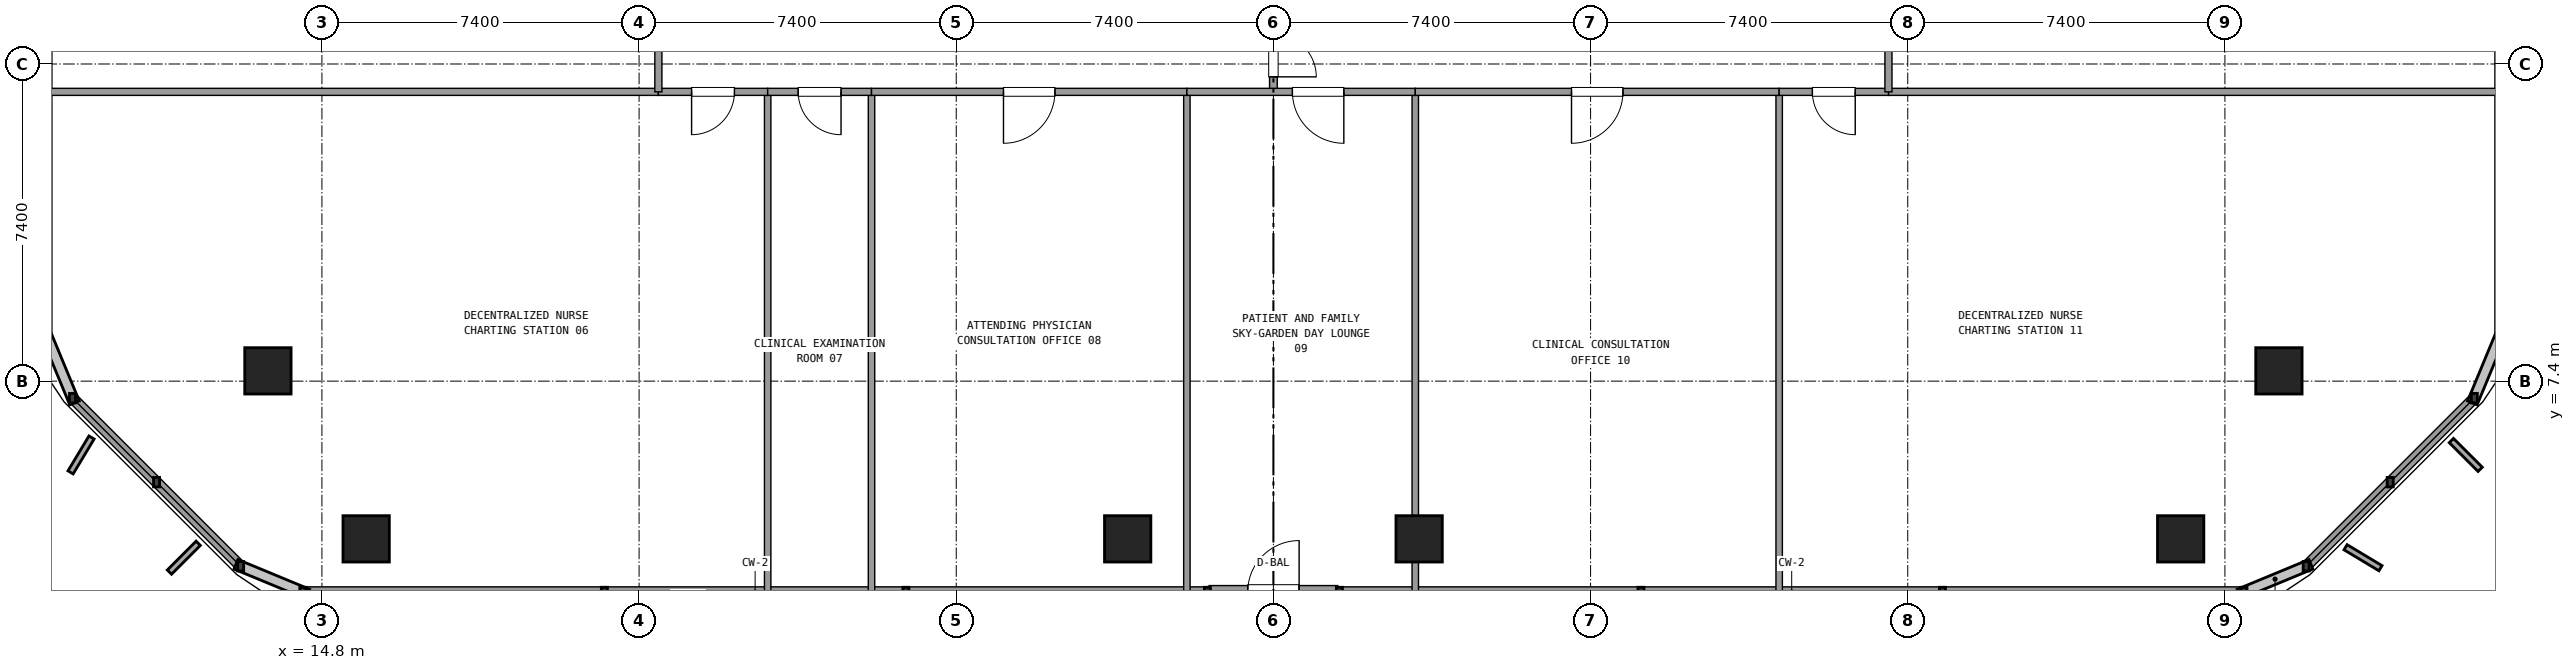
"""IFC4 building model, lengths in metres.
Left out: names, types, materials, properties, quantities, classifications, styles, units other than length and angle.
Written with IfcOpenShell. Run it as: python <this file> out.ifc"""

import sys

from ifc_helpers import new_model, si_unit, direction, frame, frame_2d, origin, origin_2d, place, context, subcontext, project, spatial, rectangle, extrude, element, fill, save


model = new_model("IFC4")
c1 = context("Model", 3, precision=1e-05, world=origin(), true_north=direction((0.0, 1.0)))
c2 = subcontext(c1, "Body", "Model", "MODEL_VIEW")
j1 = project(units=[si_unit("LENGTHUNIT", "METRE"), si_unit("PLANEANGLEUNIT", "RADIAN")], contexts=[c1])
p1 = place(None, origin())
s1 = spatial("IfcSite", under=j1, at=p1, CompositionType="ELEMENT")
p2 = place(p1, origin())
s2 = spatial("IfcBuilding", under=s1, at=p2, CompositionType="ELEMENT")
p3 = place(p2, frame((0.0, 0.0, 23.94)))
s3 = spatial("IfcBuildingStorey", under=s2, at=p3, CompositionType="ELEMENT", Elevation=23.94)
for number, where, z_axis, x_axis in (
    (1, (13.54, 7.64, 0.0), (0.0, 0.0, 1.0), (1.0, 0.0, 0.0)),
    (2, (15.832, 3.72, 0.0), (0.0, 0.0, 1.0), (1.0, 0.0, 0.0)),
    (3, (33.6, 3.72, 0.0), (0.0, 0.0, 1.0), (1.0, 0.0, 0.0)),
    (4, (40.4, 3.72, 0.0), (0.0, 0.0, 1.0), (1.0, 0.0, 0.0)),
    (5, (58.168, 3.72, 0.0), (0.0, 0.0, 1.0), (1.0, 0.0, 0.0)),
    (6, (60.46, 7.64, 0.0), (0.0, 0.0, 1.0), (1.0, 0.0, 0.0)),
):
    element("IfcColumn", number, at=place(p3, frame(where, z_axis=z_axis, x_axis=x_axis)), inside=s3, PredefinedType="COLUMN", context=c2, shape_type="SweptSolid", body=[
        extrude(rectangle(XDim=1.08, YDim=1.08, at=origin_2d()), origin(), (0.0, 0.0, 1.0), 3.6),
    ])
p4 = place(p3, frame((35.5, 2.48, 0.0), z_axis=(0.0, 0.0, 1.0), x_axis=(1.0, 0.0, 0.0)))
e7 = element("IfcWall", 7, at=p4, inside=s3, PredefinedType="SOLIDWALL", context=c2, shape_type="SweptSolid", body=[
    extrude(rectangle(XDim=3.0, YDim=0.3, at=frame_2d((1.5, 0.0))), origin(), (0.0, 0.0, 1.0), 2.65),
])
p5 = place(p4, frame((0.9, 0.0, 0.0)))
e8 = element("IfcOpeningElement", 8, at=p5, cuts=e7, PredefinedType="OPENING", context=c2, shape_type="SweptSolid", body=[
    extrude(rectangle(XDim=1.2, YDim=2.2, at=frame_2d((0.6, 1.1))), frame((0.0, 0.16, 0.0), z_axis=(0.0, -1.0, 0.0), x_axis=(1.0, 0.0, 0.0)), (0.0, 0.0, 1.0), 0.32),
])
for number, where, z_axis, x_axis in (
    (9, (14.355, 2.48, 0.0), (0.0, 0.0, 1.0), (1.0, 0.0, 0.0)),
    (10, (38.54, 2.48, 0.0), (0.0, 0.0, 1.0), (1.0, 0.0, 0.0)),
):
    element("IfcWall", number, at=place(p3, frame(where, z_axis=z_axis, x_axis=x_axis)), inside=s3, PredefinedType="SOLIDWALL", context=c2, shape_type="SweptSolid", body=[
        extrude(rectangle(XDim=21.105, YDim=0.24, at=frame_2d((10.552, 0.0))), origin(), (0.0, 0.0, 1.0), 0.85),
    ])
for number, where, z_axis, x_axis in (
    (11, (61.096, 3.081, 0.0), (0.0, 0.0, 1.0), (0.707, 0.707, 0.0)),
    (12, (8.981, 7.004, 0.0), (0.0, 0.0, 1.0), (0.707, -0.707, 0.0)),
):
    element("IfcWall", number, at=place(p3, frame(where, z_axis=z_axis, x_axis=x_axis)), inside=s3, PredefinedType="SOLIDWALL", context=c2, shape_type="SweptSolid", body=[
        extrude(rectangle(XDim=5.548, YDim=0.24, at=frame_2d((2.774, 0.0))), origin(), (0.0, 0.0, 1.0), 0.85),
    ])
p6 = place(p3, frame((37.0, 14.15, 0.0), z_axis=(0.0, 0.0, 1.0), x_axis=(0.0, 1.0, 0.0)))
e13 = element("IfcWall", 13, at=p6, inside=s3, PredefinedType="PARTITIONING", context=c2, shape_type="SweptSolid", body=[
    extrude(rectangle(XDim=2.7, YDim=0.18, at=frame_2d((1.35, 0.0))), origin(), (0.0, 0.0, 1.0), 2.61),
])
p7 = place(p6, frame((0.35, 0.0, 0.0)))
e14 = element("IfcOpeningElement", 14, at=p7, cuts=e13, PredefinedType="OPENING", context=c2, shape_type="SweptSolid", body=[
    extrude(rectangle(XDim=2.0, YDim=2.2, at=frame_2d((1.0, 1.1))), frame((0.0, 0.1, 0.0), z_axis=(0.0, -1.0, 0.0), x_axis=(1.0, 0.0, 0.0)), (0.0, 0.0, 1.0), 0.2),
])
for number, where, z_axis, x_axis in (
    (15, (8.4, 14.15, 0.0), (0.0, 0.0, 1.0), (1.0, 0.0, 0.0)),
    (16, (51.35, 14.15, 0.0), (0.0, 0.0, 1.0), (1.0, 0.0, 0.0)),
):
    element("IfcWall", number, at=place(p3, frame(where, z_axis=z_axis, x_axis=x_axis)), inside=s3, PredefinedType="PARTITIONING", context=c2, shape_type="SweptSolid", body=[
        extrude(rectangle(XDim=14.25, YDim=0.165, at=frame_2d((7.125, 0.0))), origin(), (0.0, 0.0, 1.0), 2.61),
    ])
p8 = place(p3, frame((25.2, 14.15, 0.0), z_axis=(0.0, 0.0, 1.0), x_axis=(0.0, -1.0, 0.0)))
e17 = element("IfcWall", 17, at=p8, inside=s3, PredefinedType="PARTITIONING", context=c2, shape_type="SweptSolid", body=[
    extrude(rectangle(XDim=11.65, YDim=0.15, at=frame_2d((5.825, 0.0))), origin(), (0.0, 0.0, 1.0), 2.61),
])
p9 = place(p3, frame((22.65, 14.15, 0.0), z_axis=(0.0, 0.0, 1.0), x_axis=(1.0, 0.0, 0.0)))
e18 = element("IfcWall", 18, at=p9, inside=s3, PredefinedType="PARTITIONING", context=c2, shape_type="SweptSolid", body=[
    extrude(rectangle(XDim=2.55, YDim=0.165, at=frame_2d((1.275, 0.0))), origin(), (0.0, 0.0, 1.0), 2.61),
])
p10 = place(p9, frame((0.775, 0.0, 0.0)))
e19 = element("IfcOpeningElement", 19, at=p10, cuts=e18, PredefinedType="OPENING", context=c2, shape_type="SweptSolid", body=[
    extrude(rectangle(XDim=1.0, YDim=2.15, at=frame_2d((0.5, 1.075))), frame((0.0, 0.093, 0.0), z_axis=(0.0, -1.0, 0.0), x_axis=(1.0, 0.0, 0.0)), (0.0, 0.0, 1.0), 0.185),
])
p11 = place(p3, frame((27.623, 14.15, 0.0), z_axis=(0.0, 0.0, 1.0), x_axis=(0.0, -1.0, 0.0)))
e20 = element("IfcWall", 20, at=p11, inside=s3, PredefinedType="PARTITIONING", context=c2, shape_type="SweptSolid", body=[
    extrude(rectangle(XDim=11.65, YDim=0.15, at=frame_2d((5.825, 0.0))), origin(), (0.0, 0.0, 1.0), 2.61),
])
p12 = place(p3, frame((25.2, 14.15, 0.0), z_axis=(0.0, 0.0, 1.0), x_axis=(1.0, 0.0, 0.0)))
e21 = element("IfcWall", 21, at=p12, inside=s3, PredefinedType="PARTITIONING", context=c2, shape_type="SweptSolid", body=[
    extrude(rectangle(XDim=2.423, YDim=0.165, at=frame_2d((1.211, 0.0))), origin(), (0.0, 0.0, 1.0), 2.61),
])
p13 = place(p12, frame((0.712, 0.0, 0.0)))
e22 = element("IfcOpeningElement", 22, at=p13, cuts=e21, PredefinedType="OPENING", context=c2, shape_type="SweptSolid", body=[
    extrude(rectangle(XDim=1.0, YDim=2.15, at=frame_2d((0.5, 1.075))), frame((0.0, 0.093, 0.0), z_axis=(0.0, -1.0, 0.0), x_axis=(1.0, 0.0, 0.0)), (0.0, 0.0, 1.0), 0.185),
])
p14 = place(p3, frame((34.981, 14.15, 0.0), z_axis=(0.0, 0.0, 1.0), x_axis=(0.0, -1.0, 0.0)))
e23 = element("IfcWall", 23, at=p14, inside=s3, PredefinedType="PARTITIONING", context=c2, shape_type="SweptSolid", body=[
    extrude(rectangle(XDim=11.65, YDim=0.15, at=frame_2d((5.825, 0.0))), origin(), (0.0, 0.0, 1.0), 2.61),
])
p15 = place(p3, frame((27.623, 14.15, 0.0), z_axis=(0.0, 0.0, 1.0), x_axis=(1.0, 0.0, 0.0)))
e24 = element("IfcWall", 24, at=p15, inside=s3, PredefinedType="PARTITIONING", context=c2, shape_type="SweptSolid", body=[
    extrude(rectangle(XDim=7.358, YDim=0.165, at=frame_2d((3.679, 0.0))), origin(), (0.0, 0.0, 1.0), 2.61),
])
p16 = place(p15, frame((3.079, 0.0, 0.0)))
e25 = element("IfcOpeningElement", 25, at=p16, cuts=e24, PredefinedType="OPENING", context=c2, shape_type="SweptSolid", body=[
    extrude(rectangle(XDim=1.2, YDim=2.15, at=frame_2d((0.6, 1.075))), frame((0.0, 0.093, 0.0), z_axis=(0.0, -1.0, 0.0), x_axis=(1.0, 0.0, 0.0)), (0.0, 0.0, 1.0), 0.185),
])
p17 = place(p3, frame((40.31, 14.15, 0.0), z_axis=(0.0, 0.0, 1.0), x_axis=(0.0, -1.0, 0.0)))
e26 = element("IfcWall", 26, at=p17, inside=s3, PredefinedType="PARTITIONING", context=c2, shape_type="SweptSolid", body=[
    extrude(rectangle(XDim=11.65, YDim=0.15, at=frame_2d((5.825, 0.0))), origin(), (0.0, 0.0, 1.0), 2.61),
])
p18 = place(p3, frame((34.981, 14.15, 0.0), z_axis=(0.0, 0.0, 1.0), x_axis=(1.0, 0.0, 0.0)))
e27 = element("IfcWall", 27, at=p18, inside=s3, PredefinedType="PARTITIONING", context=c2, shape_type="SweptSolid", body=[
    extrude(rectangle(XDim=5.329, YDim=0.165, at=frame_2d((2.665, 0.0))), origin(), (0.0, 0.0, 1.0), 2.61),
])
p19 = place(p18, frame((2.462, 0.0, 0.0)))
e28 = element("IfcOpeningElement", 28, at=p19, cuts=e27, PredefinedType="OPENING", context=c2, shape_type="SweptSolid", body=[
    extrude(rectangle(XDim=1.2, YDim=2.15, at=frame_2d((0.6, 1.075))), frame((0.0, 0.093, 0.0), z_axis=(0.0, -1.0, 0.0), x_axis=(1.0, 0.0, 0.0)), (0.0, 0.0, 1.0), 0.185),
])
p20 = place(p3, frame((48.8, 14.15, 0.0), z_axis=(0.0, 0.0, 1.0), x_axis=(0.0, -1.0, 0.0)))
e29 = element("IfcWall", 29, at=p20, inside=s3, PredefinedType="PARTITIONING", context=c2, shape_type="SweptSolid", body=[
    extrude(rectangle(XDim=11.65, YDim=0.15, at=frame_2d((5.825, 0.0))), origin(), (0.0, 0.0, 1.0), 2.61),
])
p21 = place(p3, frame((40.31, 14.15, 0.0), z_axis=(0.0, 0.0, 1.0), x_axis=(1.0, 0.0, 0.0)))
e30 = element("IfcWall", 30, at=p21, inside=s3, PredefinedType="PARTITIONING", context=c2, shape_type="SweptSolid", body=[
    extrude(rectangle(XDim=8.49, YDim=0.165, at=frame_2d((4.245, 0.0))), origin(), (0.0, 0.0, 1.0), 2.61),
])
p22 = place(p21, frame((3.645, 0.0, 0.0)))
e31 = element("IfcOpeningElement", 31, at=p22, cuts=e30, PredefinedType="OPENING", context=c2, shape_type="SweptSolid", body=[
    extrude(rectangle(XDim=1.2, YDim=2.15, at=frame_2d((0.6, 1.075))), frame((0.0, 0.093, 0.0), z_axis=(0.0, -1.0, 0.0), x_axis=(1.0, 0.0, 0.0)), (0.0, 0.0, 1.0), 0.185),
])
p23 = place(p3, frame((48.8, 14.15, 0.0), z_axis=(0.0, 0.0, 1.0), x_axis=(1.0, 0.0, 0.0)))
e32 = element("IfcWall", 32, at=p23, inside=s3, PredefinedType="PARTITIONING", context=c2, shape_type="SweptSolid", body=[
    extrude(rectangle(XDim=2.55, YDim=0.165, at=frame_2d((1.275, 0.0))), origin(), (0.0, 0.0, 1.0), 2.61),
])
p24 = place(p23, frame((0.775, 0.0, 0.0)))
e33 = element("IfcOpeningElement", 33, at=p24, cuts=e32, PredefinedType="OPENING", context=c2, shape_type="SweptSolid", body=[
    extrude(rectangle(XDim=1.0, YDim=2.15, at=frame_2d((0.5, 1.075))), frame((0.0, 0.093, 0.0), z_axis=(0.0, -1.0, 0.0), x_axis=(1.0, 0.0, 0.0)), (0.0, 0.0, 1.0), 0.185),
])
p25 = place(p3, frame((22.65, 14.15, 0.0), z_axis=(0.0, 0.0, 1.0), x_axis=(0.0, 1.0, 0.0)))
e34 = element("IfcWall", 34, at=p25, inside=s3, PredefinedType="PARTITIONING", context=c2, shape_type="SweptSolid", body=[
    extrude(rectangle(XDim=8.46, YDim=0.165, at=frame_2d((4.23, 0.0))), origin(), (0.0, 0.0, 1.0), 2.61),
])
p26 = place(p25, frame((3.63, 0.0, 0.0)))
e35 = element("IfcOpeningElement", 35, at=p26, cuts=e34, PredefinedType="OPENING", context=c2, shape_type="SweptSolid", body=[
    extrude(rectangle(XDim=1.2, YDim=2.15, at=frame_2d((0.6, 1.075))), frame((0.0, 0.093, 0.0), z_axis=(0.0, -1.0, 0.0), x_axis=(1.0, 0.0, 0.0)), (0.0, 0.0, 1.0), 0.185),
])
p27 = place(p3, frame((51.35, 14.15, 0.0), z_axis=(0.0, 0.0, 1.0), x_axis=(0.0, 1.0, 0.0)))
e36 = element("IfcWall", 36, at=p27, inside=s3, PredefinedType="PARTITIONING", context=c2, shape_type="SweptSolid", body=[
    extrude(rectangle(XDim=6.58, YDim=0.165, at=frame_2d((3.29, 0.0))), origin(), (0.0, 0.0, 1.0), 2.61),
])
p28 = place(p27, frame((2.69, 0.0, 0.0)))
e37 = element("IfcOpeningElement", 37, at=p28, cuts=e36, PredefinedType="OPENING", context=c2, shape_type="SweptSolid", body=[
    extrude(rectangle(XDim=1.2, YDim=2.15, at=frame_2d((0.6, 1.075))), frame((0.0, 0.093, 0.0), z_axis=(0.0, -1.0, 0.0), x_axis=(1.0, 0.0, 0.0)), (0.0, 0.0, 1.0), 0.185),
])
p29 = place(p7, frame((2.0, 0.0, 0.0), z_axis=(0.0, 0.0, 1.0), x_axis=(-1.0, 0.0, 0.0)))
e38 = element("IfcDoor", 38, at=p29, inside=s3, OperationType="DOUBLE_DOOR_SINGLE_SWING", PredefinedType="DOOR", context=c2, shape_type="SweptSolid", body=[
    extrude(rectangle(XDim=2.0, YDim=2.2, at=frame_2d((1.0, 1.1))), frame((0.0, 0.025, 0.0), z_axis=(0.0, -1.0, 0.0), x_axis=(1.0, 0.0, 0.0)), (0.0, 0.0, 1.0), 0.05),
])
fill(e14, e38)
p30 = place(p10, frame((1.0, 0.0, 0.0), z_axis=(0.0, 0.0, 1.0), x_axis=(-1.0, 0.0, 0.0)))
e39 = element("IfcDoor", 39, at=p30, inside=s3, OperationType="SINGLE_SWING_LEFT", PredefinedType="DOOR", context=c2, shape_type="SweptSolid", body=[
    extrude(rectangle(XDim=1.0, YDim=2.15, at=frame_2d((0.5, 1.075))), frame((0.0, 0.025, 0.0), z_axis=(0.0, -1.0, 0.0), x_axis=(1.0, 0.0, 0.0)), (0.0, 0.0, 1.0), 0.05),
])
fill(e19, e39)
p31 = place(p13, frame((1.0, 0.0, 0.0), z_axis=(0.0, 0.0, 1.0), x_axis=(-1.0, 0.0, 0.0)))
e40 = element("IfcDoor", 40, at=p31, inside=s3, OperationType="SINGLE_SWING_RIGHT", PredefinedType="DOOR", context=c2, shape_type="SweptSolid", body=[
    extrude(rectangle(XDim=1.0, YDim=2.15, at=frame_2d((0.5, 1.075))), frame((0.0, 0.025, 0.0), z_axis=(0.0, -1.0, 0.0), x_axis=(1.0, 0.0, 0.0)), (0.0, 0.0, 1.0), 0.05),
])
fill(e22, e40)
p32 = place(p16, frame((1.2, 0.0, 0.0), z_axis=(0.0, 0.0, 1.0), x_axis=(-1.0, 0.0, 0.0)))
e41 = element("IfcDoor", 41, at=p32, inside=s3, OperationType="SINGLE_SWING_LEFT", PredefinedType="DOOR", context=c2, shape_type="SweptSolid", body=[
    extrude(rectangle(XDim=1.2, YDim=2.15, at=frame_2d((0.6, 1.075))), frame((0.0, 0.025, 0.0), z_axis=(0.0, -1.0, 0.0), x_axis=(1.0, 0.0, 0.0)), (0.0, 0.0, 1.0), 0.05),
])
fill(e25, e41)
p33 = place(p19, frame((1.2, 0.0, 0.0), z_axis=(0.0, 0.0, 1.0), x_axis=(-1.0, 0.0, 0.0)))
e42 = element("IfcDoor", 42, at=p33, inside=s3, OperationType="SINGLE_SWING_RIGHT", PredefinedType="DOOR", context=c2, shape_type="SweptSolid", body=[
    extrude(rectangle(XDim=1.2, YDim=2.15, at=frame_2d((0.6, 1.075))), frame((0.0, 0.025, 0.0), z_axis=(0.0, -1.0, 0.0), x_axis=(1.0, 0.0, 0.0)), (0.0, 0.0, 1.0), 0.05),
])
fill(e28, e42)
p34 = place(p22, frame((1.2, 0.0, 0.0), z_axis=(0.0, 0.0, 1.0), x_axis=(-1.0, 0.0, 0.0)))
e43 = element("IfcDoor", 43, at=p34, inside=s3, OperationType="SINGLE_SWING_LEFT", PredefinedType="DOOR", context=c2, shape_type="SweptSolid", body=[
    extrude(rectangle(XDim=1.2, YDim=2.15, at=frame_2d((0.6, 1.075))), frame((0.0, 0.025, 0.0), z_axis=(0.0, -1.0, 0.0), x_axis=(1.0, 0.0, 0.0)), (0.0, 0.0, 1.0), 0.05),
])
fill(e31, e43)
p35 = place(p24, frame((1.0, 0.0, 0.0), z_axis=(0.0, 0.0, 1.0), x_axis=(-1.0, 0.0, 0.0)))
e44 = element("IfcDoor", 44, at=p35, inside=s3, OperationType="SINGLE_SWING_RIGHT", PredefinedType="DOOR", context=c2, shape_type="SweptSolid", body=[
    extrude(rectangle(XDim=1.0, YDim=2.15, at=frame_2d((0.5, 1.075))), frame((0.0, 0.025, 0.0), z_axis=(0.0, -1.0, 0.0), x_axis=(1.0, 0.0, 0.0)), (0.0, 0.0, 1.0), 0.05),
])
fill(e33, e44)
save(model, sys.argv[1])
